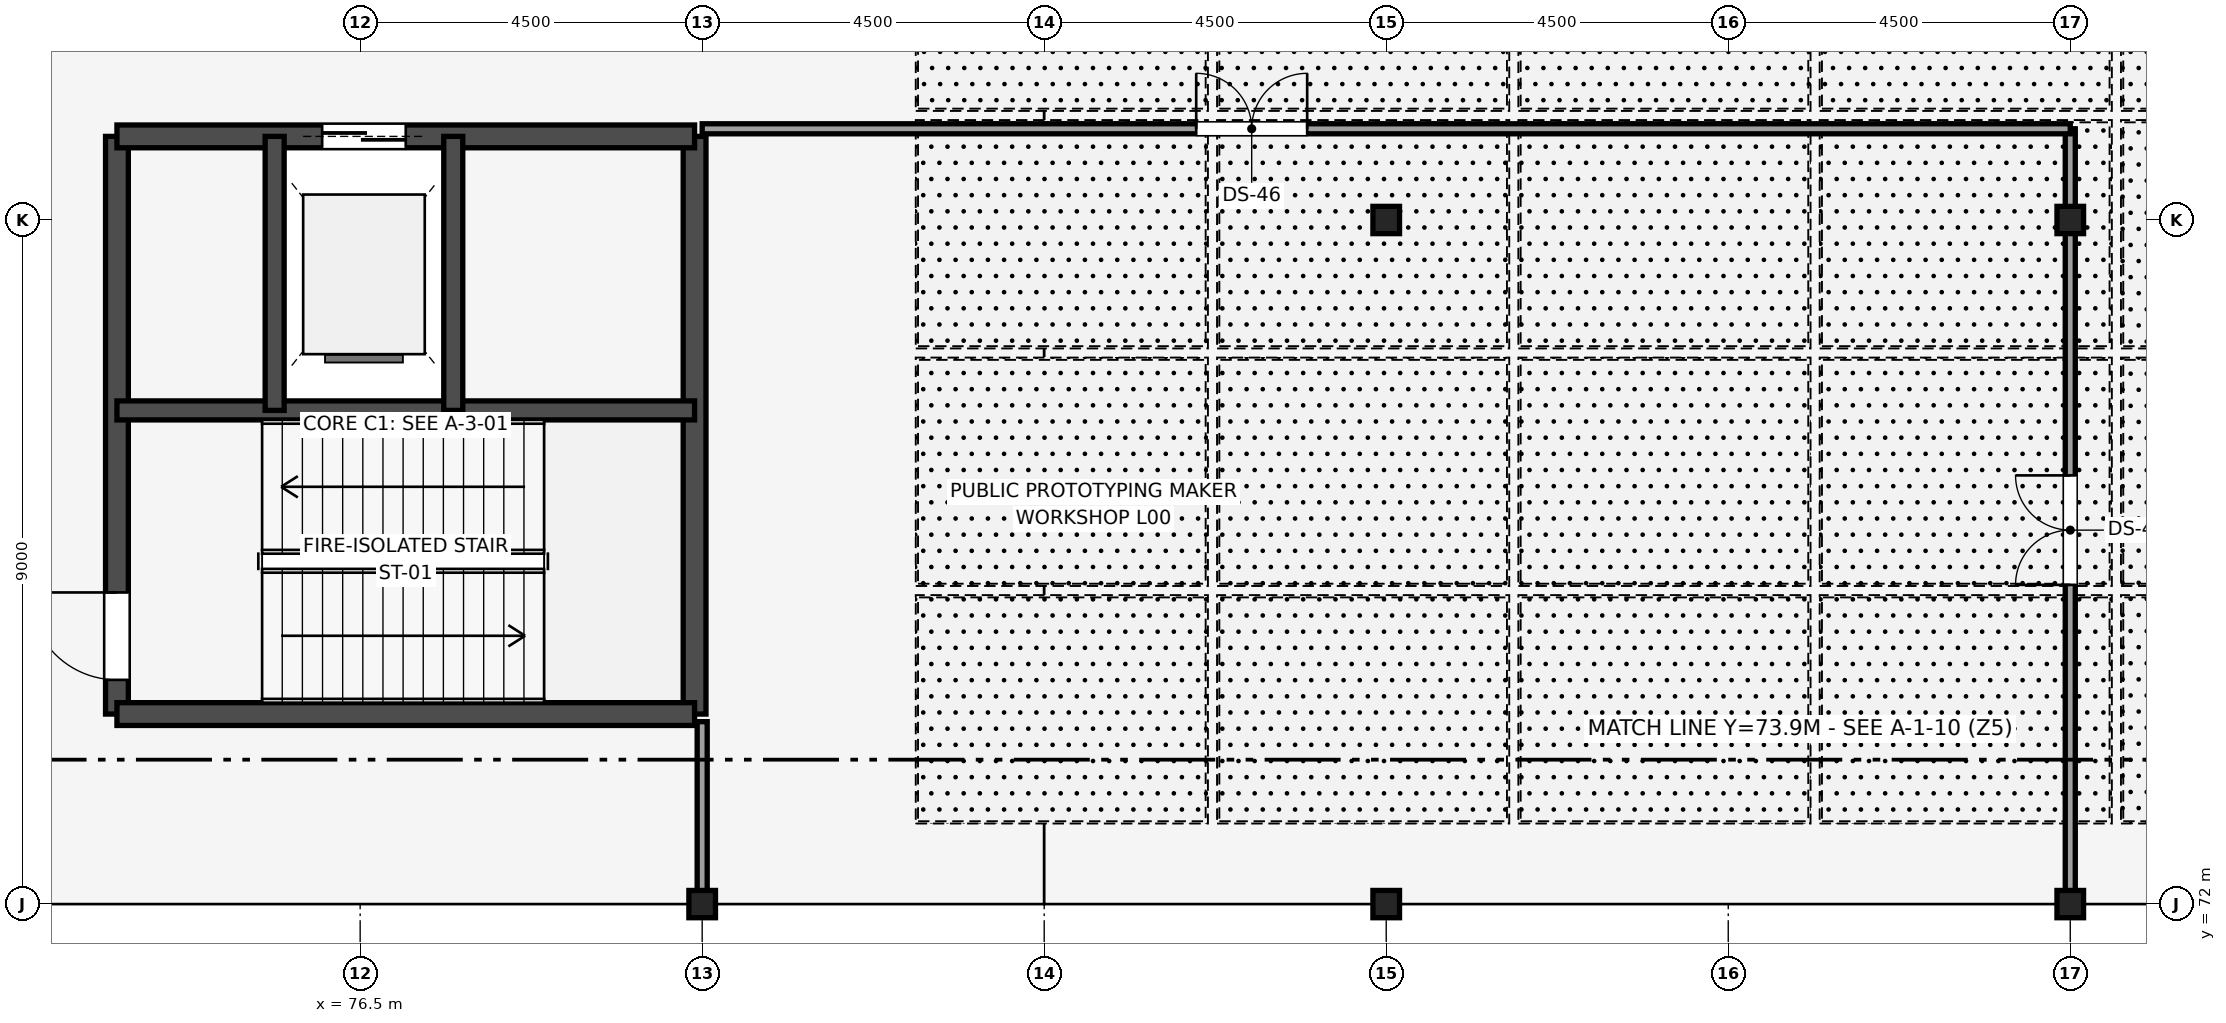
"""IFC4 building model, lengths in metres.
Left out: names, types, materials, properties, quantities, classifications, styles, units other than length and angle.
Written with IfcOpenShell. Run it as: python <this file> out.ifc"""

import sys

from ifc_helpers import new_model, si_unit, direction, frame, frame_2d, origin, origin_2d, place, context, subcontext, project, spatial, rectangle, i_section, extrude, element, fill, save


model = new_model("IFC4")
c1 = context("Model", 3, precision=1e-05, world=origin(), true_north=direction((0.0, 1.0)))
c2 = subcontext(c1, "Body", "Model", "MODEL_VIEW")
j1 = project(units=[si_unit("LENGTHUNIT", "METRE"), si_unit("PLANEANGLEUNIT", "RADIAN")], contexts=[c1])
p1 = place(None, origin())
s1 = spatial("IfcSite", under=j1, at=p1, CompositionType="ELEMENT")
p2 = place(p1, origin())
s2 = spatial("IfcBuilding", under=s1, at=p2, CompositionType="ELEMENT")
p3 = place(p2, origin())
s3 = spatial("IfcBuildingStorey", under=s2, at=p3, CompositionType="ELEMENT", Elevation=0.0)
for number, where, z_axis, x_axis in (
    (1, (81.0, 72.0, 0.0), (0.0, 0.0, 1.0), (1.0, 0.0, 0.0)),
    (2, (90.0, 72.0, 0.0), (0.0, 0.0, 1.0), (1.0, 0.0, 0.0)),
    (3, (90.0, 81.0, 0.0), (0.0, 0.0, 1.0), (1.0, 0.0, 0.0)),
    (4, (99.0, 72.0, 0.0), (0.0, 0.0, 1.0), (1.0, 0.0, 0.0)),
    (5, (99.0, 81.0, 0.0), (0.0, 0.0, 1.0), (1.0, 0.0, 0.0)),
):
    element("IfcColumn", number, at=place(p3, frame(where, z_axis=z_axis, x_axis=x_axis)), inside=s3, PredefinedType="COLUMN", context=c2, shape_type="SweptSolid", body=[
        extrude(i_section(OverallWidth=0.35, OverallDepth=0.359, WebThickness=0.016, FlangeThickness=0.024, FilletRadius=0.014, at=origin_2d()), origin(), (0.0, 0.0, 1.0), 5.4),
    ])
p4 = place(p3, frame((73.3, 74.5, 0.0), z_axis=(0.0, 0.0, 1.0), x_axis=(0.0, 1.0, 0.0)))
e6 = element("IfcWall", 6, at=p4, inside=s3, PredefinedType="SHEAR", context=c2, shape_type="SweptSolid", body=[
    extrude(rectangle(XDim=7.6, YDim=0.3, at=frame_2d((3.8, 0.0))), origin(), (0.0, 0.0, 1.0), 5.4),
])
p5 = place(p4, frame((0.45, 0.0, 0.0)))
e7 = element("IfcOpeningElement", 7, at=p5, cuts=e6, PredefinedType="OPENING", context=c2, shape_type="SweptSolid", body=[
    extrude(rectangle(XDim=1.15, YDim=2.15, at=frame_2d((0.575, 1.075))), frame((0.0, 0.16, 0.0), z_axis=(0.0, -1.0, 0.0), x_axis=(1.0, 0.0, 0.0)), (0.0, 0.0, 1.0), 0.32),
])
p6 = place(p3, frame((80.9, 74.5, 0.0), z_axis=(0.0, 0.0, 1.0), x_axis=(0.0, 1.0, 0.0)))
e8 = element("IfcWall", 8, at=p6, inside=s3, PredefinedType="SHEAR", context=c2, shape_type="SweptSolid", body=[
    extrude(rectangle(XDim=7.6, YDim=0.3, at=frame_2d((3.8, 0.0))), origin(), (0.0, 0.0, 1.0), 5.4),
])
p7 = place(p3, frame((73.3, 74.5, 0.0), z_axis=(0.0, 0.0, 1.0), x_axis=(1.0, 0.0, 0.0)))
e9 = element("IfcWall", 9, at=p7, inside=s3, PredefinedType="SHEAR", context=c2, shape_type="SweptSolid", body=[
    extrude(rectangle(XDim=7.6, YDim=0.3, at=frame_2d((3.8, 0.0))), origin(), (0.0, 0.0, 1.0), 5.4),
])
p8 = place(p3, frame((73.3, 82.1, 0.0), z_axis=(0.0, 0.0, 1.0), x_axis=(1.0, 0.0, 0.0)))
e10 = element("IfcWall", 10, at=p8, inside=s3, PredefinedType="SHEAR", context=c2, shape_type="SweptSolid", body=[
    extrude(rectangle(XDim=7.6, YDim=0.3, at=frame_2d((3.8, 0.0))), origin(), (0.0, 0.0, 1.0), 5.4),
])
p9 = place(p8, frame((2.7, 0.0, 0.0)))
e11 = element("IfcOpeningElement", 11, at=p9, cuts=e10, PredefinedType="OPENING", context=c2, shape_type="SweptSolid", body=[
    extrude(rectangle(XDim=1.1, YDim=2.2, at=frame_2d((0.55, 1.1))), frame((0.0, 0.16, 0.0), z_axis=(0.0, -1.0, 0.0), x_axis=(1.0, 0.0, 0.0)), (0.0, 0.0, 1.0), 0.32),
])
p10 = place(p3, frame((73.3, 78.495, 0.0), z_axis=(0.0, 0.0, 1.0), x_axis=(1.0, 0.0, 0.0)))
e12 = element("IfcWall", 12, at=p10, inside=s3, PredefinedType="SHEAR", context=c2, shape_type="SweptSolid", body=[
    extrude(rectangle(XDim=7.6, YDim=0.25, at=frame_2d((3.8, 0.0))), origin(), (0.0, 0.0, 1.0), 5.4),
])
for number, where, z_axis, x_axis in (
    (13, (75.375, 78.495, 0.0), (0.0, 0.0, 1.0), (0.0, 1.0, 0.0)),
    (14, (77.725, 78.495, 0.0), (0.0, 0.0, 1.0), (0.0, 1.0, 0.0)),
):
    element("IfcWall", number, at=place(p3, frame(where, z_axis=z_axis, x_axis=x_axis)), inside=s3, PredefinedType="SHEAR", context=c2, shape_type="SweptSolid", body=[
        extrude(rectangle(XDim=3.605, YDim=0.25, at=frame_2d((1.802, 0.0))), origin(), (0.0, 0.0, 1.0), 5.4),
    ])
p11 = place(p3, frame((99.0, 72.0, 0.0), z_axis=(0.0, 0.0, 1.0), x_axis=(1.0, 0.0, 0.0)))
e15 = element("IfcWall", 15, at=p11, inside=s3, PredefinedType="STANDARD", context=c2, shape_type="SweptSolid", body=[
    extrude(rectangle(XDim=9.0, YDim=0.25, at=frame_2d((4.5, 0.0))), origin(), (0.0, 0.0, 1.0), 4.746),
])
p12 = place(p11, frame((3.5, 0.0, 0.0)))
e16 = element("IfcOpeningElement", 16, at=p12, cuts=e15, PredefinedType="OPENING", context=c2, shape_type="SweptSolid", body=[
    extrude(rectangle(XDim=2.0, YDim=2.5, at=frame_2d((1.0, 1.25))), frame((0.0, 0.135, 0.0), z_axis=(0.0, -1.0, 0.0), x_axis=(1.0, 0.0, 0.0)), (0.0, 0.0, 1.0), 0.27),
])
p13 = place(p3, frame((81.0, 72.0, 0.0), z_axis=(0.0, 0.0, 1.0), x_axis=(0.0, 1.0, 0.0)))
e17 = element("IfcWall", 17, at=p13, inside=s3, PredefinedType="PARTITIONING", context=c2, shape_type="SweptSolid", body=[
    extrude(rectangle(XDim=2.4, YDim=0.132, at=frame_2d((1.2, 0.0))), origin(), (0.0, 0.0, 1.0), 4.5),
])
p14 = place(p3, frame((99.0, 72.0, 0.0), z_axis=(0.0, 0.0, 1.0), x_axis=(0.0, 1.0, 0.0)))
e18 = element("IfcWall", 18, at=p14, inside=s3, PredefinedType="PARTITIONING", context=c2, shape_type="SweptSolid", body=[
    extrude(rectangle(XDim=10.2, YDim=0.132, at=frame_2d((5.1, 0.0))), origin(), (0.0, 0.0, 1.0), 4.672),
])
p15 = place(p14, frame((4.2, 0.0, 0.0)))
e19 = element("IfcOpeningElement", 19, at=p15, cuts=e18, PredefinedType="OPENING", context=c2, shape_type="SweptSolid", body=[
    extrude(rectangle(XDim=1.44, YDim=2.325, at=frame_2d((0.72, 1.163))), frame((0.0, 0.076, 0.0), z_axis=(0.0, -1.0, 0.0), x_axis=(1.0, 0.0, 0.0)), (0.0, 0.0, 1.0), 0.152),
])
p16 = place(p3, frame((81.0, 82.2, 0.0), z_axis=(0.0, 0.0, 1.0), x_axis=(1.0, 0.0, 0.0)))
e20 = element("IfcWall", 20, at=p16, inside=s3, PredefinedType="PARTITIONING", context=c2, shape_type="SweptSolid", body=[
    extrude(rectangle(XDim=18.0, YDim=0.132, at=frame_2d((9.0, 0.0))), origin(), (0.0, 0.0, 1.0), 5.22),
])
p17 = place(p16, frame((6.5, 0.0, 0.0)))
e21 = element("IfcOpeningElement", 21, at=p17, cuts=e20, PredefinedType="OPENING", context=c2, shape_type="SweptSolid", body=[
    extrude(rectangle(XDim=1.46, YDim=2.325, at=frame_2d((0.73, 1.163))), frame((0.0, 0.076, 0.0), z_axis=(0.0, -1.0, 0.0), x_axis=(1.0, 0.0, 0.0)), (0.0, 0.0, 1.0), 0.152),
])
p18 = place(p5, origin())
e22 = element("IfcDoor", 22, at=p18, inside=s3, OperationType="SINGLE_SWING_RIGHT", PredefinedType="DOOR", context=c2, shape_type="SweptSolid", body=[
    extrude(rectangle(XDim=1.15, YDim=2.15, at=frame_2d((0.575, 1.075))), frame((0.0, 0.025, 0.0), z_axis=(0.0, -1.0, 0.0), x_axis=(1.0, 0.0, 0.0)), (0.0, 0.0, 1.0), 0.05),
])
fill(e7, e22)
p19 = place(p9, origin())
e23 = element("IfcDoor", 23, at=p19, inside=s3, OperationType="DOUBLE_DOOR_SLIDING", PredefinedType="DOOR", context=c2, shape_type="SweptSolid", body=[
    extrude(rectangle(XDim=1.1, YDim=2.2, at=frame_2d((0.55, 1.1))), frame((0.0, 0.025, 0.0), z_axis=(0.0, -1.0, 0.0), x_axis=(1.0, 0.0, 0.0)), (0.0, 0.0, 1.0), 0.05),
])
fill(e11, e23)
p20 = place(p15, origin())
e24 = element("IfcDoor", 24, at=p20, inside=s3, OperationType="DOUBLE_DOOR_SINGLE_SWING", PredefinedType="DOOR", context=c2, shape_type="SweptSolid", body=[
    extrude(rectangle(XDim=1.44, YDim=2.325, at=frame_2d((0.72, 1.163))), frame((0.0, 0.025, 0.0), z_axis=(0.0, -1.0, 0.0), x_axis=(1.0, 0.0, 0.0)), (0.0, 0.0, 1.0), 0.05),
])
fill(e19, e24)
p21 = place(p17, origin())
e25 = element("IfcDoor", 25, at=p21, inside=s3, OperationType="DOUBLE_DOOR_SINGLE_SWING", PredefinedType="DOOR", context=c2, shape_type="SweptSolid", body=[
    extrude(rectangle(XDim=1.46, YDim=2.325, at=frame_2d((0.73, 1.163))), frame((0.0, 0.025, 0.0), z_axis=(0.0, -1.0, 0.0), x_axis=(1.0, 0.0, 0.0)), (0.0, 0.0, 1.0), 0.05),
])
fill(e21, e25)
save(model, sys.argv[1])
